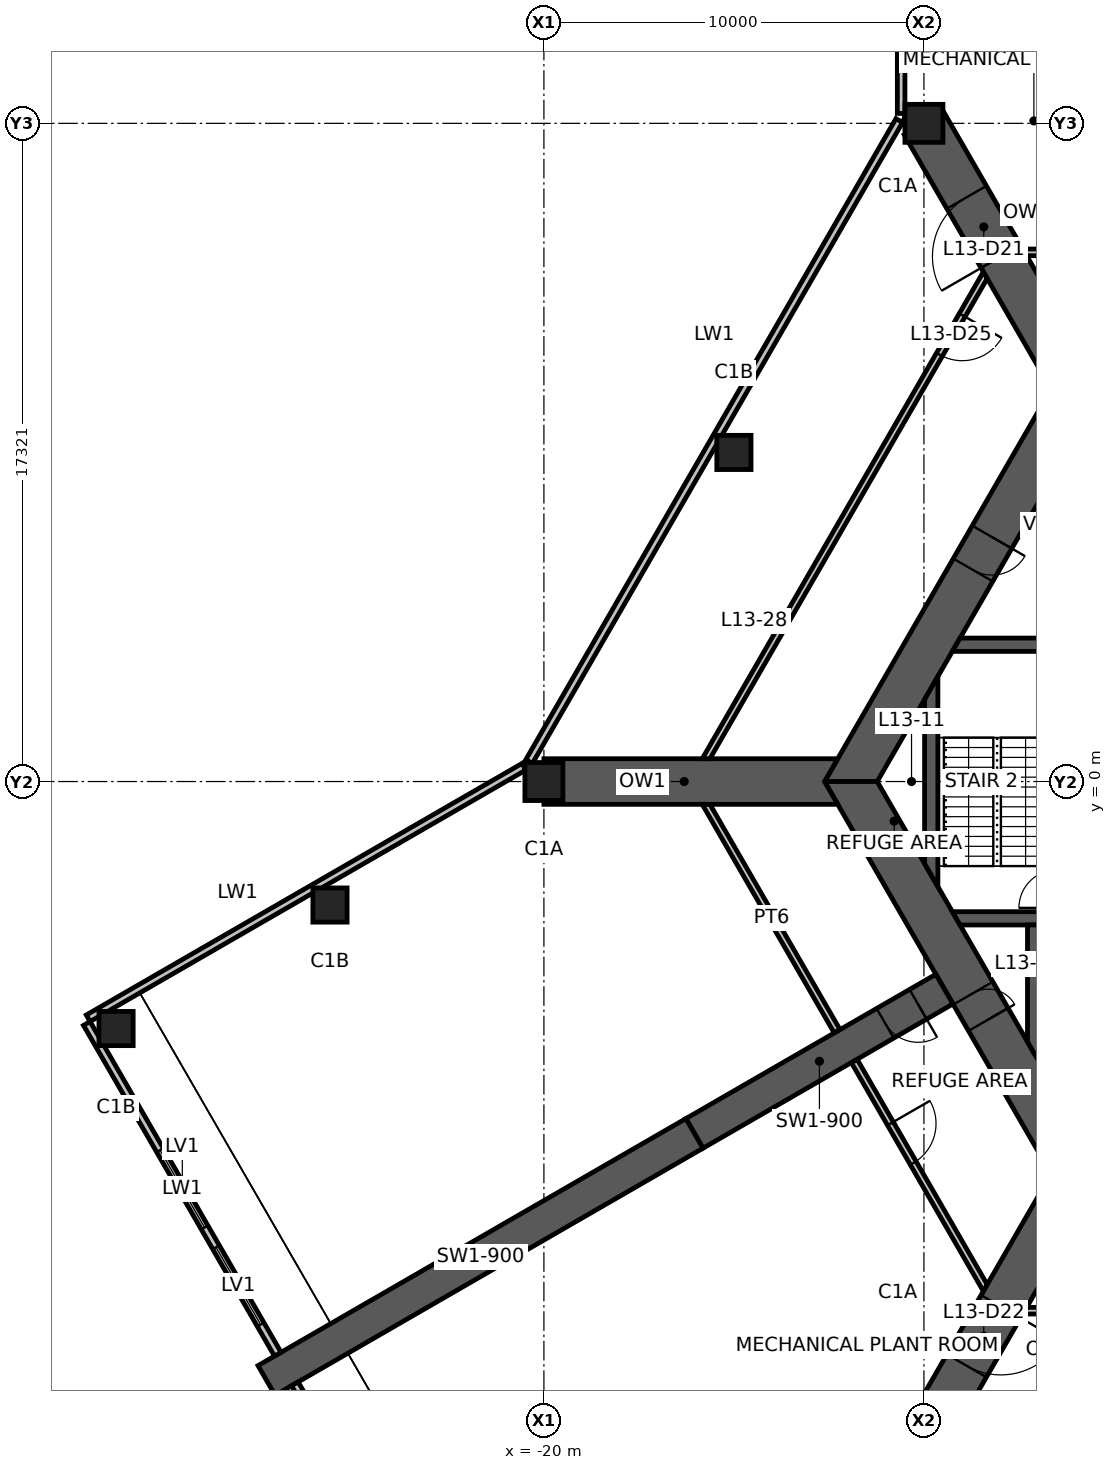
"""IFC4 building model, lengths in metres.
Left out: names, types, materials, properties, quantities, classifications, styles, units other than length and angle.
Written with IfcOpenShell. Run it as: python <this file> out.ifc"""

import sys

from ifc_helpers import new_model, si_unit, direction, frame, frame_2d, origin, origin_2d, place, context, subcontext, project, spatial, polyline, rectangle, hollow_rectangle, outline, extrude, element, fill, save


model = new_model("IFC4")
c1 = context("Model", 3, precision=1e-05, world=origin(), true_north=direction((0.0, 1.0)))
c2 = subcontext(c1, "Body", "Model", "MODEL_VIEW")
j1 = project(units=[si_unit("LENGTHUNIT", "METRE"), si_unit("PLANEANGLEUNIT", "RADIAN")], contexts=[c1])
p1 = place(None, origin())
s1 = spatial("IfcSite", under=j1, at=p1, CompositionType="ELEMENT")
p2 = place(p1, origin())
s2 = spatial("IfcBuilding", under=s1, at=p2, CompositionType="ELEMENT")
p3 = place(p2, frame((0.0, 0.0, 52.0)))
s3 = spatial("IfcBuildingStorey", under=s2, at=p3, CompositionType="ELEMENT", Elevation=52.0)
for number, where, z_axis, x_axis in (
    (1, (-10.0, 17.321, 0.0), (0.0, 0.0, 1.0), (1.0, 0.0, 0.0)),
    (2, (-20.0, 0.0, 0.0), (0.0, 0.0, 1.0), (1.0, 0.0, 0.0)),
):
    element("IfcColumn", number, at=place(p3, frame(where, z_axis=z_axis, x_axis=x_axis)), inside=s3, PredefinedType="COLUMN", context=c2, shape_type="SweptSolid", body=[
        extrude(hollow_rectangle(XDim=1.0, YDim=1.0, WallThickness=0.06, at=origin_2d()), origin(), (0.0, 0.0, 1.0), 5.0),
    ])
for number, where, z_axis, x_axis in (
    (3, (-15.0, 8.66, 0.0), (0.0, 0.0, 1.0), (1.0, 0.0, 0.0)),
    (4, (-25.629, -3.25, 0.0), (0.0, 0.0, 1.0), (1.0, 0.0, 0.0)),
    (5, (-31.258, -6.5, 0.0), (0.0, 0.0, 1.0), (1.0, 0.0, 0.0)),
):
    element("IfcColumn", number, at=place(p3, frame(where, z_axis=z_axis, x_axis=x_axis)), inside=s3, PredefinedType="COLUMN", context=c2, shape_type="SweptSolid", body=[
        extrude(hollow_rectangle(XDim=0.9, YDim=0.9, WallThickness=0.05, at=origin_2d()), origin(), (0.0, 0.0, 1.0), 5.0),
    ])
p4 = place(p3, frame((-5.961, 10.325, 0.0), z_axis=(0.0, 0.0, 1.0), x_axis=(-0.500004296715, -0.866022923061, 0.0)))
e6 = element("IfcWall", 6, at=p4, inside=s3, PredefinedType="SHEAR", context=c2, shape_type="SweptSolid", body=[
    extrude(outline(polyline([(-0.346, -0.6), (4.494, -0.6), (5.494, -0.6), (12.269, -0.6), (11.576, 0.6), (5.494, 0.6), (4.494, 0.6), (0.346, 0.6), (-0.346, -0.6)])), origin(), (0.0, 0.0, 1.0), 5.0),
])
p5 = place(p4, frame((4.494, 0.0, 0.0)))
e7 = element("IfcOpeningElement", 7, at=p5, cuts=e6, PredefinedType="OPENING", context=c2, shape_type="SweptSolid", body=[
    extrude(rectangle(XDim=1.0, YDim=2.1, at=frame_2d((0.5, 1.05))), frame((0.0, 0.61, 0.0), z_axis=(0.0, -1.0, 0.0), x_axis=(1.0, 0.0, 0.0)), (0.0, 0.0, 1.0), 1.22),
])
p6 = place(p3, frame((-11.922, 0.0, 0.0), z_axis=(0.0, 0.0, 1.0), x_axis=(0.500004296715, -0.866022923061, 0.0)))
e8 = element("IfcWall", 8, at=p6, inside=s3, PredefinedType="SHEAR", context=c2, shape_type="SweptSolid", body=[
    extrude(outline(polyline([(-0.346, -0.6), (6.431, -0.6), (7.231, -0.6), (12.269, -0.6), (11.576, 0.6), (7.231, 0.6), (6.431, 0.6), (0.346, 0.6), (-0.346, -0.6)])), origin(), (0.0, 0.0, 1.0), 5.0),
])
p7 = place(p6, frame((6.431, 0.0, 0.0)))
e9 = element("IfcOpeningElement", 9, at=p7, cuts=e8, PredefinedType="OPENING", context=c2, shape_type="SweptSolid", body=[
    extrude(rectangle(XDim=0.8, YDim=2.1, at=frame_2d((0.4, 1.05))), frame((0.0, 0.61, 0.0), z_axis=(0.0, -1.0, 0.0), x_axis=(1.0, 0.0, 0.0)), (0.0, 0.0, 1.0), 1.22),
])
p8 = place(p3, frame((-9.461, -5.462, 0.0), z_axis=(0.0, 0.0, 1.0), x_axis=(-0.866019116917, -0.500010889016, 0.0)))
e10 = element("IfcWall", 10, at=p8, inside=s3, PredefinedType="SHEAR", context=c2, shape_type="SweptSolid", body=[
    extrude(rectangle(XDim=7.595, YDim=0.9, at=frame_2d((3.798, 0.0))), origin(), (0.0, 0.0, 1.0), 5.0),
])
p9 = place(p8, frame((0.8, 0.0, 0.0)))
e11 = element("IfcOpeningElement", 11, at=p9, cuts=e10, PredefinedType="OPENING", context=c2, shape_type="SweptSolid", body=[
    extrude(rectangle(XDim=1.0, YDim=2.1, at=frame_2d((0.5, 1.05))), frame((0.0, 0.46, 0.0), z_axis=(0.0, -1.0, 0.0), x_axis=(1.0, 0.0, 0.0)), (0.0, 0.0, 1.0), 0.92),
])
p10 = place(p3, frame((-16.039, -9.26, 0.0), z_axis=(0.0, 0.0, 1.0), x_axis=(-0.866024837091, -0.50000098154, 0.0)))
e12 = element("IfcWall", 12, at=p10, inside=s3, PredefinedType="SHEAR", context=c2, shape_type="SweptSolid", body=[
    extrude(rectangle(XDim=13.0, YDim=0.9, at=frame_2d((6.5, 0.0))), origin(), (0.0, 0.0, 1.0), 5.0),
])
p11 = place(p3, frame((-6.308, 10.925, -1.15), z_axis=(0.0, 0.0, 1.0), x_axis=(-0.499993363642, 0.866029235253, 0.0)))
e13 = element("IfcWall", 13, at=p11, inside=s3, PredefinedType="SHEAR", context=c2, shape_type="SweptSolid", body=[
    extrude(outline(polyline([(-0.346, -0.6), (3.338, -0.6), (5.138, -0.6), (7.385, -0.6), (7.385, 0.6), (5.138, 0.6), (3.338, 0.6), (-0.346, 0.6), (0.0, 0.0), (-0.346, -0.6)])), origin(), (0.0, 0.0, 1.0), 6.15),
])
p12 = place(p11, frame((3.338, 0.0, 1.15)))
e14 = element("IfcOpeningElement", 14, at=p12, cuts=e13, PredefinedType="OPENING", context=c2, shape_type="SweptSolid", body=[
    extrude(rectangle(XDim=1.8, YDim=2.4, at=frame_2d((0.9, 1.2))), frame((0.0, 0.61, 0.0), z_axis=(0.0, -1.0, 0.0), x_axis=(1.0, 0.0, 0.0)), (0.0, 0.0, 1.0), 1.22),
])
p13 = place(p3, frame((-12.615, 0.0, -1.15), z_axis=(0.0, 0.0, 1.0), x_axis=(-1.0, 0.0, 0.0)))
e15 = element("IfcWall", 15, at=p13, inside=s3, PredefinedType="SHEAR", context=c2, shape_type="SweptSolid", body=[
    extrude(outline(polyline([(-0.346, -0.6), (7.385, -0.6), (7.385, 0.6), (-0.346, 0.6), (0.0, 0.0), (-0.346, -0.6)])), origin(), (0.0, 0.0, 1.0), 6.15),
])
p14 = place(p3, frame((-6.308, -10.925, -1.15), z_axis=(0.0, 0.0, 1.0), x_axis=(-0.499993363642, -0.866029235253, 0.0)))
e16 = element("IfcWall", 16, at=p14, inside=s3, PredefinedType="SHEAR", context=c2, shape_type="SweptSolid", body=[
    extrude(outline(polyline([(-0.346, -0.6), (3.338, -0.6), (5.138, -0.6), (7.385, -0.6), (7.385, 0.6), (5.138, 0.6), (3.338, 0.6), (-0.346, 0.6), (0.0, 0.0), (-0.346, -0.6)])), origin(), (0.0, 0.0, 1.0), 6.15),
])
p15 = place(p14, frame((3.338, 0.0, 1.15)))
e17 = element("IfcOpeningElement", 17, at=p15, cuts=e16, PredefinedType="OPENING", context=c2, shape_type="SweptSolid", body=[
    extrude(rectangle(XDim=1.8, YDim=2.4, at=frame_2d((0.9, 1.2))), frame((0.0, 0.61, 0.0), z_axis=(0.0, -1.0, 0.0), x_axis=(1.0, 0.0, 0.0)), (0.0, 0.0, 1.0), 1.22),
])
p16 = place(p3, frame((-10.6, 30.821, 0.0), z_axis=(0.0, 0.0, 1.0), x_axis=(0.0, -1.0, 0.0)))
e18 = element("IfcWall", 18, at=p16, inside=s3, PredefinedType="ELEMENTEDWALL", context=c2, shape_type="SweptSolid", body=[
    extrude(rectangle(XDim=13.239, YDim=0.2, at=frame_2d((6.62, 0.0))), origin(), (0.0, 0.0, 1.0), 5.0),
])
p17 = place(p3, frame((-10.65, 17.395, 0.0), z_axis=(0.0, 0.0, 1.0), x_axis=(-0.499999841607, -0.866025495233, 0.0)))
e19 = element("IfcWall", 19, at=p17, inside=s3, PredefinedType="ELEMENTEDWALL", context=c2, shape_type="SweptSolid", body=[
    extrude(rectangle(XDim=19.479, YDim=0.2, at=frame_2d((9.739, 0.0))), origin(), (0.0, 0.0, 1.0), 5.0),
])
p18 = place(p3, frame((-20.526, 0.389, 0.0), z_axis=(0.0, 0.0, 1.0), x_axis=(-0.86602620781, -0.499998607384, 0.0)))
e20 = element("IfcWall", 20, at=p18, inside=s3, PredefinedType="ELEMENTEDWALL", context=c2, shape_type="SweptSolid", body=[
    extrude(rectangle(XDim=13.239, YDim=0.2, at=frame_2d((6.62, 0.0))), origin(), (0.0, 0.0, 1.0), 5.0),
])
p19 = place(p3, frame((-32.028, -6.367, 0.0), z_axis=(0.0, 0.0, 1.0), x_axis=(0.499990214365, -0.86603105345, 0.0)))
e21 = element("IfcWall", 21, at=p19, inside=s3, PredefinedType="ELEMENTEDWALL", context=c2, shape_type="SweptSolid", body=[
    extrude(rectangle(XDim=10.05, YDim=0.2, at=frame_2d((5.025, 0.0))), origin(), (0.0, 0.0, 1.0), 5.0),
])
p20 = place(p19, frame((3.85, 0.0, 0.6)))
e22 = element("IfcOpeningElement", 22, at=p20, cuts=e21, PredefinedType="OPENING", context=c2, shape_type="SweptSolid", body=[
    extrude(rectangle(XDim=2.35, YDim=3.6, at=frame_2d((1.175, 1.8))), frame((0.0, 0.11, 0.0), z_axis=(0.0, -1.0, 0.0), x_axis=(1.0, 0.0, 0.0)), (0.0, 0.0, 1.0), 0.22),
])
p21 = place(p19, frame((6.8, 0.0, 0.6)))
e23 = element("IfcOpeningElement", 23, at=p21, cuts=e21, PredefinedType="OPENING", context=c2, shape_type="SweptSolid", body=[
    extrude(rectangle(XDim=2.35, YDim=3.6, at=frame_2d((1.175, 1.8))), frame((0.0, 0.11, 0.0), z_axis=(0.0, -1.0, 0.0), x_axis=(1.0, 0.0, 0.0)), (0.0, 0.0, 1.0), 0.22),
])
p22 = place(p3, frame((-26.553, -15.85, 0.0), z_axis=(0.0, 0.0, 1.0), x_axis=(0.500008433718, -0.866020534521, 0.0)))
e24 = element("IfcWall", 24, at=p22, inside=s3, PredefinedType="ELEMENTEDWALL", context=c2, shape_type="SweptSolid", body=[
    extrude(rectangle(XDim=10.05, YDim=0.2, at=frame_2d((5.025, 0.0))), origin(), (0.0, 0.0, 1.0), 5.0),
])
p23 = place(p22, frame((0.9, 0.0, 0.6)))
e25 = element("IfcOpeningElement", 25, at=p23, cuts=e24, PredefinedType="OPENING", context=c2, shape_type="SweptSolid", body=[
    extrude(rectangle(XDim=2.35, YDim=3.6, at=frame_2d((1.175, 1.8))), frame((0.0, 0.11, 0.0), z_axis=(0.0, -1.0, 0.0), x_axis=(1.0, 0.0, 0.0)), (0.0, 0.0, 1.0), 0.22),
])
p24 = place(p22, frame((3.85, 0.0, 0.6)))
e26 = element("IfcOpeningElement", 26, at=p24, cuts=e24, PredefinedType="OPENING", context=c2, shape_type="SweptSolid", body=[
    extrude(rectangle(XDim=2.35, YDim=3.6, at=frame_2d((1.175, 1.8))), frame((0.0, 0.11, 0.0), z_axis=(0.0, -1.0, 0.0), x_axis=(1.0, 0.0, 0.0)), (0.0, 0.0, 1.0), 0.22),
])
p25 = place(p3, frame((-9.151, 3.6, 0.0), z_axis=(0.0, 0.0, 1.0), x_axis=(1.0, 0.0, 0.0)))
e27 = element("IfcWall", 27, at=p25, inside=s3, PredefinedType="SHEAR", context=c2, shape_type="SweptSolid", body=[
    extrude(outline(polyline([(-0.101, -0.175), (3.151, -0.175), (4.151, -0.175), (7.726, -0.175), (7.726, 0.175), (4.151, 0.175), (3.151, 0.175), (0.101, 0.175), (-0.101, -0.175)])), origin(), (0.0, 0.0, 1.0), 5.0),
])
p26 = place(p25, frame((3.151, 0.0, 0.0)))
e28 = element("IfcOpeningElement", 28, at=p26, cuts=e27, PredefinedType="OPENING", context=c2, shape_type="SweptSolid", body=[
    extrude(rectangle(XDim=1.0, YDim=2.1, at=frame_2d((0.5, 1.05))), frame((0.0, 0.185, 0.0), z_axis=(0.0, -1.0, 0.0), x_axis=(1.0, 0.0, 0.0)), (0.0, 0.0, 1.0), 0.37),
])
p27 = place(p3, frame((-9.151, -3.6, 0.0), z_axis=(0.0, 0.0, 1.0), x_axis=(1.0, 0.0, 0.0)))
e29 = element("IfcWall", 29, at=p27, inside=s3, PredefinedType="SHEAR", context=c2, shape_type="SweptSolid", body=[
    extrude(outline(polyline([(0.101, -0.175), (3.001, -0.175), (4.301, -0.175), (7.726, -0.175), (7.726, 0.175), (4.301, 0.175), (3.001, 0.175), (-0.101, 0.175), (0.101, -0.175)])), origin(), (0.0, 0.0, 1.0), 5.0),
])
p28 = place(p27, frame((3.001, 0.0, 0.0)))
e30 = element("IfcOpeningElement", 30, at=p28, cuts=e29, PredefinedType="OPENING", context=c2, shape_type="SweptSolid", body=[
    extrude(rectangle(XDim=1.3, YDim=2.1, at=frame_2d((0.65, 1.05))), frame((0.0, 0.185, 0.0), z_axis=(0.0, -1.0, 0.0), x_axis=(1.0, 0.0, 0.0)), (0.0, 0.0, 1.0), 0.37),
])
p29 = place(p3, frame((-7.1, -3.775, 0.0), z_axis=(0.0, 0.0, 1.0), x_axis=(0.0, -1.0, 0.0)))
e31 = element("IfcWall", 31, at=p29, inside=s3, PredefinedType="SHEAR", context=c2, shape_type="SweptSolid", body=[
    extrude(outline(polyline([(0.0, -0.175), (3.074, -0.175), (3.377, 0.0), (3.4, 0.175), (0.0, 0.175), (0.0, -0.175)])), origin(), (0.0, 0.0, 1.0), 5.0),
])
p30 = place(p3, frame((-9.808, -2.462, 0.0), z_axis=(0.0, 0.0, 1.0), x_axis=(0.0, 1.0, 0.0)))
e32 = element("IfcWall", 32, at=p30, inside=s3, PredefinedType="SHEAR", context=c2, shape_type="SweptSolid", body=[
    extrude(outline(polyline([(-0.303, -0.175), (5.228, -0.175), (4.621, 0.175), (0.303, 0.175), (-0.303, -0.175)])), origin(), (0.0, 0.0, 1.0), 5.0),
])
p31 = place(p3, frame((-0.455, 13.925, 0.0), z_axis=(0.0, 0.0, 1.0), x_axis=(-1.0, 0.0, 0.0)))
e33 = element("IfcWall", 33, at=p31, inside=s3, PredefinedType="PARTITIONING", context=c2, shape_type="SweptSolid", body=[
    extrude(outline(polyline([(0.0, -0.087), (1.9, -0.087), (3.1, -0.087), (6.942, -0.087), (6.841, 0.087), (3.1, 0.087), (1.9, 0.087), (0.0, 0.087), (0.0, -0.087)])), origin(), (0.0, 0.0, 1.0), 4.83),
])
p32 = place(p31, frame((1.9, 0.0, 0.0)))
e34 = element("IfcOpeningElement", 34, at=p32, cuts=e33, PredefinedType="OPENING", context=c2, shape_type="SweptSolid", body=[
    extrude(rectangle(XDim=1.2, YDim=2.1, at=frame_2d((0.6, 1.05))), frame((0.0, 0.098, 0.0), z_axis=(0.0, -1.0, 0.0), x_axis=(1.0, 0.0, 0.0)), (0.0, 0.0, 1.0), 0.195),
])
p33 = place(p3, frame((-8.386, 13.325, 0.0), z_axis=(0.0, 0.0, 1.0), x_axis=(-0.500011547171, -0.866018736919, 0.0)))
e35 = element("IfcWall", 35, at=p33, inside=s3, PredefinedType="PARTITIONING", context=c2, shape_type="SweptSolid", body=[
    extrude(outline(polyline([(-0.051, -0.087), (1.213, -0.087), (2.413, -0.087), (14.744, -0.087), (14.643, 0.087), (2.413, 0.087), (1.213, 0.087), (0.051, 0.087), (-0.051, -0.087)])), origin(), (0.0, 0.0, 1.0), 4.83),
])
p34 = place(p33, frame((1.213, 0.0, 0.0)))
e36 = element("IfcOpeningElement", 36, at=p34, cuts=e35, PredefinedType="OPENING", context=c2, shape_type="SweptSolid", body=[
    extrude(rectangle(XDim=1.2, YDim=2.1, at=frame_2d((0.6, 1.05))), frame((0.0, 0.098, 0.0), z_axis=(0.0, -1.0, 0.0), x_axis=(1.0, 0.0, 0.0)), (0.0, 0.0, 1.0), 0.195),
])
p35 = place(p3, frame((-15.733, -0.6, 0.0), z_axis=(0.0, 0.0, 1.0), x_axis=(0.500013761451, -0.866017458461, 0.0)))
e37 = element("IfcWall", 37, at=p35, inside=s3, PredefinedType="PARTITIONING", context=c2, shape_type="SweptSolid", body=[
    extrude(outline(polyline([(-0.051, -0.087), (6.892, -0.087), (6.892, 0.087), (0.051, 0.087), (-0.051, -0.087)])), origin(), (0.0, 0.0, 1.0), 4.83),
])
p36 = place(p3, frame((-11.832, -7.356, 0.0), z_axis=(0.0, 0.0, 1.0), x_axis=(0.49998719302, -0.866032797772, 0.0)))
e38 = element("IfcWall", 38, at=p36, inside=s3, PredefinedType="PARTITIONING", context=c2, shape_type="SweptSolid", body=[
    extrude(outline(polyline([(0.0, -0.087), (1.9, -0.087), (3.1, -0.087), (6.942, -0.087), (6.841, 0.087), (3.1, 0.087), (1.9, 0.087), (0.0, 0.087), (0.0, -0.087)])), origin(), (0.0, 0.0, 1.0), 4.83),
])
p37 = place(p36, frame((1.9, 0.0, 0.0)))
e39 = element("IfcOpeningElement", 39, at=p37, cuts=e38, PredefinedType="OPENING", context=c2, shape_type="SweptSolid", body=[
    extrude(rectangle(XDim=1.2, YDim=2.1, at=frame_2d((0.6, 1.05))), frame((0.0, 0.098, 0.0), z_axis=(0.0, -1.0, 0.0), x_axis=(1.0, 0.0, 0.0)), (0.0, 0.0, 1.0), 0.195),
])
p38 = place(p3, frame((-7.347, -13.925, 0.0), z_axis=(0.0, 0.0, 1.0), x_axis=(1.0, 0.0, 0.0)))
e40 = element("IfcWall", 40, at=p38, inside=s3, PredefinedType="PARTITIONING", context=c2, shape_type="SweptSolid", body=[
    extrude(outline(polyline([(-0.051, -0.087), (1.213, -0.087), (2.413, -0.087), (14.744, -0.087), (14.643, 0.087), (2.413, 0.087), (1.213, 0.087), (0.051, 0.087), (-0.051, -0.087)])), origin(), (0.0, 0.0, 1.0), 4.83),
])
p39 = place(p38, frame((1.213, 0.0, 0.0)))
e41 = element("IfcOpeningElement", 41, at=p39, cuts=e40, PredefinedType="OPENING", context=c2, shape_type="SweptSolid", body=[
    extrude(rectangle(XDim=1.2, YDim=2.1, at=frame_2d((0.6, 1.05))), frame((0.0, 0.098, 0.0), z_axis=(0.0, -1.0, 0.0), x_axis=(1.0, 0.0, 0.0)), (0.0, 0.0, 1.0), 0.195),
])
p40 = place(p20, origin())
e42 = element("IfcWindow", 42, at=p40, inside=s3, PartitioningType="SINGLE_PANEL", PredefinedType="USERDEFINED", context=c2, shape_type="SweptSolid", body=[
    extrude(rectangle(XDim=2.35, YDim=3.6, at=frame_2d((1.175, 1.8))), frame((0.0, 0.03, 0.0), z_axis=(0.0, -1.0, 0.0), x_axis=(1.0, 0.0, 0.0)), (0.0, 0.0, 1.0), 0.06),
])
fill(e22, e42)
p41 = place(p21, origin())
e43 = element("IfcWindow", 43, at=p41, inside=s3, PartitioningType="SINGLE_PANEL", PredefinedType="USERDEFINED", context=c2, shape_type="SweptSolid", body=[
    extrude(rectangle(XDim=2.35, YDim=3.6, at=frame_2d((1.175, 1.8))), frame((0.0, 0.03, 0.0), z_axis=(0.0, -1.0, 0.0), x_axis=(1.0, 0.0, 0.0)), (0.0, 0.0, 1.0), 0.06),
])
fill(e23, e43)
p42 = place(p7, origin())
e44 = element("IfcDoor", 44, at=p42, inside=s3, OperationType="SINGLE_SWING_RIGHT", PredefinedType="DOOR", context=c2, shape_type="SweptSolid", body=[
    extrude(rectangle(XDim=0.8, YDim=2.1, at=frame_2d((0.4, 1.05))), frame((0.0, 0.025, 0.0), z_axis=(0.0, -1.0, 0.0), x_axis=(1.0, 0.0, 0.0)), (0.0, 0.0, 1.0), 0.05),
])
fill(e9, e44)
p43 = place(p5, origin())
e45 = element("IfcDoor", 45, at=p43, inside=s3, OperationType="SINGLE_SWING_LEFT", PredefinedType="DOOR", context=c2, shape_type="SweptSolid", body=[
    extrude(rectangle(XDim=1.0, YDim=2.1, at=frame_2d((0.5, 1.05))), frame((0.0, 0.025, 0.0), z_axis=(0.0, -1.0, 0.0), x_axis=(1.0, 0.0, 0.0)), (0.0, 0.0, 1.0), 0.05),
])
fill(e7, e45)
p44 = place(p9, origin())
e46 = element("IfcDoor", 46, at=p44, inside=s3, OperationType="SINGLE_SWING_LEFT", PredefinedType="DOOR", context=c2, shape_type="SweptSolid", body=[
    extrude(rectangle(XDim=1.0, YDim=2.1, at=frame_2d((0.5, 1.05))), frame((0.0, 0.025, 0.0), z_axis=(0.0, -1.0, 0.0), x_axis=(1.0, 0.0, 0.0)), (0.0, 0.0, 1.0), 0.05),
])
fill(e11, e46)
p45 = place(p12, origin())
e47 = element("IfcDoor", 47, at=p45, inside=s3, OperationType="DOUBLE_DOOR_SINGLE_SWING", PredefinedType="DOOR", context=c2, shape_type="SweptSolid", body=[
    extrude(rectangle(XDim=1.8, YDim=2.4, at=frame_2d((0.9, 1.2))), frame((0.0, 0.025, 0.0), z_axis=(0.0, -1.0, 0.0), x_axis=(1.0, 0.0, 0.0)), (0.0, 0.0, 1.0), 0.05),
])
fill(e14, e47)
p46 = place(p15, origin())
e48 = element("IfcDoor", 48, at=p46, inside=s3, OperationType="DOUBLE_DOOR_SINGLE_SWING", PredefinedType="DOOR", context=c2, shape_type="SweptSolid", body=[
    extrude(rectangle(XDim=1.8, YDim=2.4, at=frame_2d((0.9, 1.2))), frame((0.0, 0.025, 0.0), z_axis=(0.0, -1.0, 0.0), x_axis=(1.0, 0.0, 0.0)), (0.0, 0.0, 1.0), 0.05),
])
fill(e17, e48)
p47 = place(p34, origin())
e49 = element("IfcDoor", 49, at=p47, inside=s3, OperationType="DOUBLE_DOOR_SINGLE_SWING", PredefinedType="DOOR", context=c2, shape_type="SweptSolid", body=[
    extrude(rectangle(XDim=1.2, YDim=2.1, at=frame_2d((0.6, 1.05))), frame((0.0, 0.025, 0.0), z_axis=(0.0, -1.0, 0.0), x_axis=(1.0, 0.0, 0.0)), (0.0, 0.0, 1.0), 0.05),
])
fill(e36, e49)
p48 = place(p37, origin())
e50 = element("IfcDoor", 50, at=p48, inside=s3, OperationType="DOUBLE_DOOR_SINGLE_SWING", PredefinedType="DOOR", context=c2, shape_type="SweptSolid", body=[
    extrude(rectangle(XDim=1.2, YDim=2.1, at=frame_2d((0.6, 1.05))), frame((0.0, 0.025, 0.0), z_axis=(0.0, -1.0, 0.0), x_axis=(1.0, 0.0, 0.0)), (0.0, 0.0, 1.0), 0.05),
])
fill(e39, e50)
save(model, sys.argv[1])
